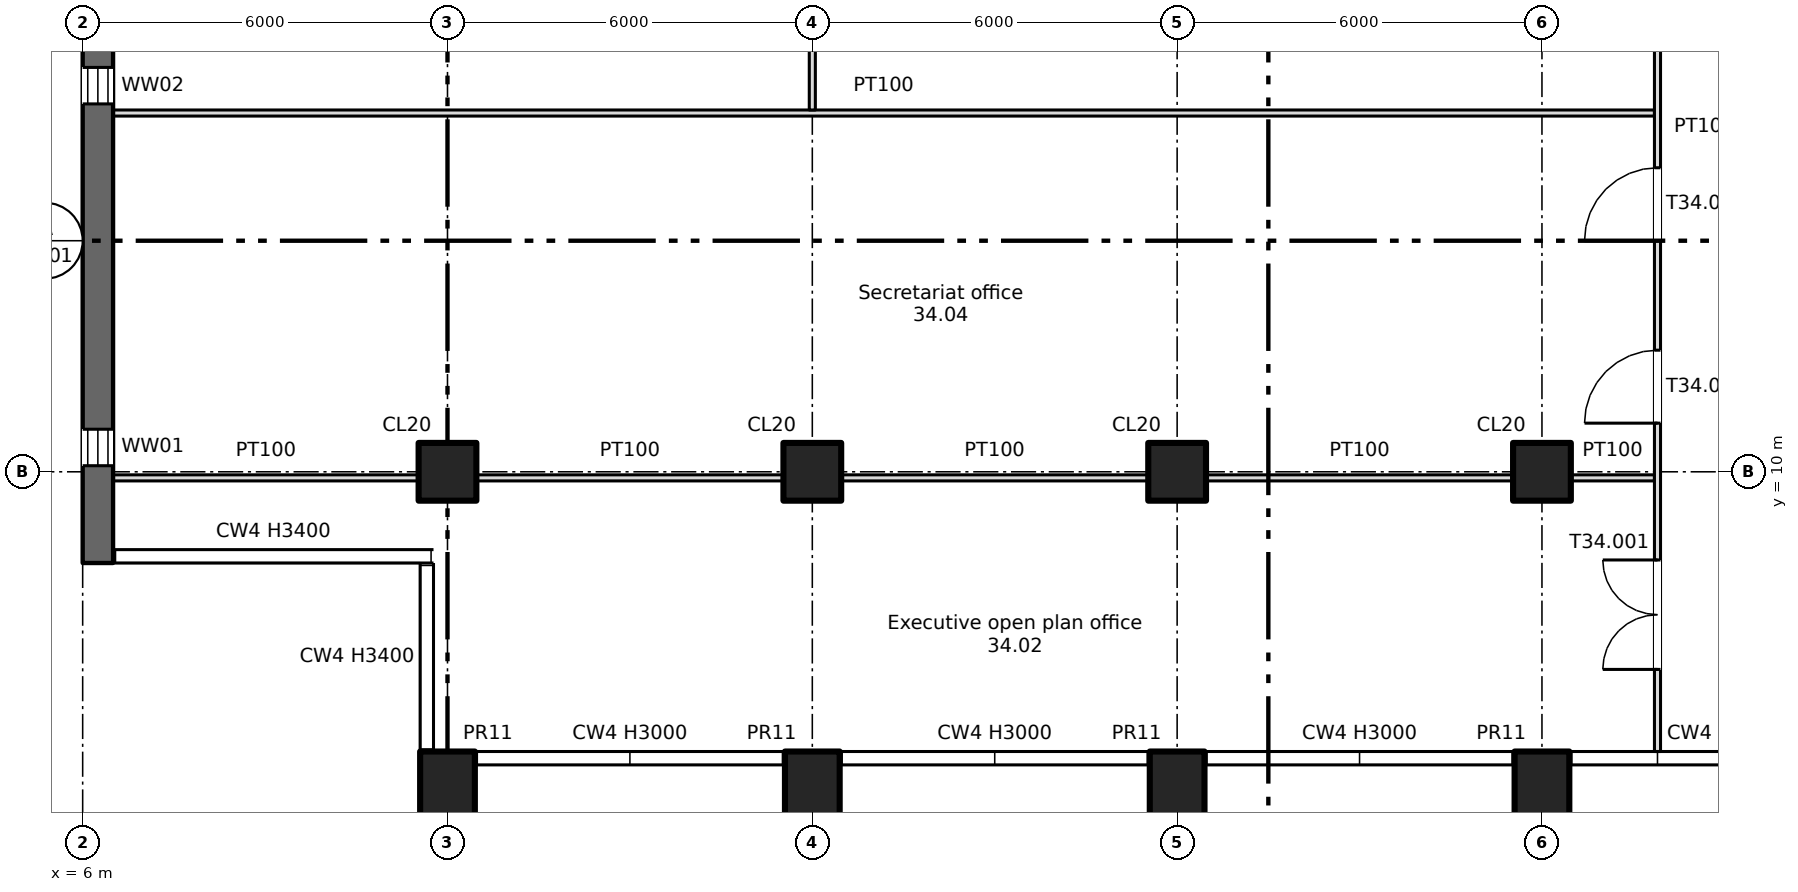
"""IFC4 building model, lengths in metres.
Left out: names, types, materials, properties, quantities, classifications, styles, units other than length and angle.
Written with IfcOpenShell. Run it as: python <this file> out.ifc"""

import sys

from ifc_helpers import new_model, si_unit, direction, frame, frame_2d, origin, origin_2d, place, context, subcontext, project, spatial, rectangle, extrude, element, fill, save


model = new_model("IFC4")
c1 = context("Model", 3, precision=1e-05, world=origin(), true_north=direction((0.0, 1.0)))
c2 = subcontext(c1, "Body", "Model", "MODEL_VIEW")
j1 = project(units=[si_unit("LENGTHUNIT", "METRE"), si_unit("PLANEANGLEUNIT", "RADIAN")], contexts=[c1])
p1 = place(None, origin())
s1 = spatial("IfcSite", under=j1, at=p1, CompositionType="ELEMENT")
p2 = place(p1, origin())
s2 = spatial("IfcBuilding", under=s1, at=p2, CompositionType="ELEMENT")
p3 = place(p2, frame((0.0, 0.0, 235.55)))
s3 = spatial("IfcBuildingStorey", under=s2, at=p3, CompositionType="ELEMENT", Elevation=235.55)
for number, where, z_axis, x_axis in (
    (1, (12.0, 4.7, -0.4), (0.0, 0.0, 1.0), (1.0, 0.0, 0.0)),
    (2, (18.0, 4.7, -0.4), (0.0, 0.0, 1.0), (1.0, 0.0, 0.0)),
    (3, (24.0, 4.7, -0.4), (0.0, 0.0, 1.0), (1.0, 0.0, 0.0)),
    (4, (30.0, 4.7, -0.4), (0.0, 0.0, 1.0), (1.0, 0.0, 0.0)),
):
    element("IfcColumn", number, at=place(p3, frame(where, z_axis=z_axis, x_axis=x_axis)), inside=s3, PredefinedType="COLUMN", context=c2, shape_type="SweptSolid", body=[
        extrude(rectangle(XDim=0.9, YDim=1.4, at=origin_2d()), origin(), (0.0, 0.0, 1.0), 3.8),
    ])
for number, where, z_axis, x_axis in (
    (5, (12.0, 10.0, 0.0), (0.0, 0.0, 1.0), (1.0, 0.0, 0.0)),
    (6, (18.0, 10.0, 0.0), (0.0, 0.0, 1.0), (1.0, 0.0, 0.0)),
    (7, (24.0, 10.0, 0.0), (0.0, 0.0, 1.0), (1.0, 0.0, 0.0)),
    (8, (30.0, 10.0, 0.0), (0.0, 0.0, 1.0), (1.0, 0.0, 0.0)),
):
    element("IfcColumn", number, at=place(p3, frame(where, z_axis=z_axis, x_axis=x_axis)), inside=s3, PredefinedType="COLUMN", context=c2, shape_type="SweptSolid", body=[
        extrude(rectangle(XDim=0.95, YDim=0.95, at=origin_2d()), origin(), (0.0, 0.0, 1.0), 3.4),
    ])
p4 = place(p3, frame((6.25, 8.5, 0.0), z_axis=(0.0, 0.0, 1.0), x_axis=(0.0, 1.0, 0.0)))
e9 = element("IfcWall", 9, at=p4, inside=s3, PredefinedType="SHEAR", context=c2, shape_type="SweptSolid", body=[
    extrude(rectangle(XDim=33.0, YDim=0.5, at=frame_2d((16.5, 0.0))), origin(), (0.0, 0.0, 1.0), 3.4),
])
p5 = place(p4, frame((1.6, 0.0, 0.6)))
e10 = element("IfcOpeningElement", 10, at=p5, cuts=e9, PredefinedType="OPENING", context=c2, shape_type="SweptSolid", body=[
    extrude(rectangle(XDim=0.6, YDim=2.4, at=frame_2d((0.3, 1.2))), frame((0.0, 0.26, 0.0), z_axis=(0.0, -1.0, 0.0), x_axis=(1.0, 0.0, 0.0)), (0.0, 0.0, 1.0), 0.52),
])
p6 = place(p4, frame((7.55, 0.0, 0.6)))
e11 = element("IfcOpeningElement", 11, at=p6, cuts=e9, PredefinedType="OPENING", context=c2, shape_type="SweptSolid", body=[
    extrude(rectangle(XDim=0.6, YDim=2.4, at=frame_2d((0.3, 1.2))), frame((0.0, 0.26, 0.0), z_axis=(0.0, -1.0, 0.0), x_axis=(1.0, 0.0, 0.0)), (0.0, 0.0, 1.0), 0.52),
])
p7 = place(p4, frame((13.2, 0.0, 0.6)))
e12 = element("IfcOpeningElement", 12, at=p7, cuts=e9, PredefinedType="OPENING", context=c2, shape_type="SweptSolid", body=[
    extrude(rectangle(XDim=0.6, YDim=2.4, at=frame_2d((0.3, 1.2))), frame((0.0, 0.26, 0.0), z_axis=(0.0, -1.0, 0.0), x_axis=(1.0, 0.0, 0.0)), (0.0, 0.0, 1.0), 0.52),
])
p8 = place(p3, frame((30.475, 9.9, 0.0), z_axis=(0.0, 0.0, 1.0), x_axis=(1.0, 0.0, 0.0)))
e13 = element("IfcWall", 13, at=p8, inside=s3, PredefinedType="PARTITIONING", context=c2, shape_type="SweptSolid", body=[
    extrude(rectangle(XDim=1.375, YDim=0.1, at=frame_2d((0.688, 0.0))), origin(), (0.0, 0.0, 1.0), 3.4),
])
for number, where, z_axis, x_axis in (
    (14, (24.475, 9.9, 0.0), (0.0, 0.0, 1.0), (1.0, 0.0, 0.0)),
    (15, (18.475, 9.9, 0.0), (0.0, 0.0, 1.0), (1.0, 0.0, 0.0)),
    (16, (12.475, 9.9, 0.0), (0.0, 0.0, 1.0), (1.0, 0.0, 0.0)),
):
    element("IfcWall", number, at=place(p3, frame(where, z_axis=z_axis, x_axis=x_axis)), inside=s3, PredefinedType="PARTITIONING", context=c2, shape_type="SweptSolid", body=[
        extrude(rectangle(XDim=5.05, YDim=0.1, at=frame_2d((2.525, 0.0))), origin(), (0.0, 0.0, 1.0), 3.4),
    ])
p9 = place(p3, frame((6.5, 9.9, 0.0), z_axis=(0.0, 0.0, 1.0), x_axis=(1.0, 0.0, 0.0)))
e17 = element("IfcWall", 17, at=p9, inside=s3, PredefinedType="PARTITIONING", context=c2, shape_type="SweptSolid", body=[
    extrude(rectangle(XDim=5.025, YDim=0.1, at=frame_2d((2.512, 0.0))), origin(), (0.0, 0.0, 1.0), 3.4),
])
p10 = place(p3, frame((6.5, 15.9, 0.0), z_axis=(0.0, 0.0, 1.0), x_axis=(1.0, 0.0, 0.0)))
e18 = element("IfcWall", 18, at=p10, inside=s3, PredefinedType="PARTITIONING", context=c2, shape_type="SweptSolid", body=[
    extrude(rectangle(XDim=25.35, YDim=0.1, at=frame_2d((12.675, 0.0))), origin(), (0.0, 0.0, 1.0), 3.4),
])
p11 = place(p3, frame((18.0, 15.95, 0.0), z_axis=(0.0, 0.0, 1.0), x_axis=(0.0, 1.0, 0.0)))
e19 = element("IfcWall", 19, at=p11, inside=s3, PredefinedType="PARTITIONING", context=c2, shape_type="SweptSolid", body=[
    extrude(rectangle(XDim=2.575, YDim=0.1, at=frame_2d((1.288, 0.0))), origin(), (0.0, 0.0, 1.0), 3.4),
])
p12 = place(p3, frame((31.9, 5.4, 0.0), z_axis=(0.0, 0.0, 1.0), x_axis=(0.0, 1.0, 0.0)))
e20 = element("IfcWall", 20, at=p12, inside=s3, PredefinedType="PARTITIONING", context=c2, shape_type="SweptSolid", body=[
    extrude(rectangle(XDim=20.55, YDim=0.1, at=frame_2d((10.275, 0.0))), origin(), (0.0, 0.0, 1.0), 3.4),
])
p13 = place(p12, frame((1.35, 0.0, 0.0)))
e21 = element("IfcOpeningElement", 21, at=p13, cuts=e20, PredefinedType="OPENING", context=c2, shape_type="SweptSolid", body=[
    extrude(rectangle(XDim=1.8, YDim=2.1, at=frame_2d((0.9, 1.05))), frame((0.0, 0.06, 0.0), z_axis=(0.0, -1.0, 0.0), x_axis=(1.0, 0.0, 0.0)), (0.0, 0.0, 1.0), 0.12),
])
p14 = place(p12, frame((5.4, 0.0, 0.0)))
e22 = element("IfcOpeningElement", 22, at=p14, cuts=e20, PredefinedType="OPENING", context=c2, shape_type="SweptSolid", body=[
    extrude(rectangle(XDim=1.2, YDim=2.1, at=frame_2d((0.6, 1.05))), frame((0.0, 0.06, 0.0), z_axis=(0.0, -1.0, 0.0), x_axis=(1.0, 0.0, 0.0)), (0.0, 0.0, 1.0), 0.12),
])
p15 = place(p12, frame((8.4, 0.0, 0.0)))
e23 = element("IfcOpeningElement", 23, at=p15, cuts=e20, PredefinedType="OPENING", context=c2, shape_type="SweptSolid", body=[
    extrude(rectangle(XDim=1.2, YDim=2.1, at=frame_2d((0.6, 1.05))), frame((0.0, 0.06, 0.0), z_axis=(0.0, -1.0, 0.0), x_axis=(1.0, 0.0, 0.0)), (0.0, 0.0, 1.0), 0.12),
])
p16 = place(p5, origin())
e24 = element("IfcWindow", 24, at=p16, inside=s3, PartitioningType="SINGLE_PANEL", PredefinedType="WINDOW", context=c2, shape_type="SweptSolid", body=[
    extrude(rectangle(XDim=0.6, YDim=2.4, at=frame_2d((0.3, 1.2))), frame((0.0, 0.03, 0.0), z_axis=(0.0, -1.0, 0.0), x_axis=(1.0, 0.0, 0.0)), (0.0, 0.0, 1.0), 0.06),
])
fill(e10, e24)
p17 = place(p6, origin())
e25 = element("IfcWindow", 25, at=p17, inside=s3, PartitioningType="SINGLE_PANEL", PredefinedType="WINDOW", context=c2, shape_type="SweptSolid", body=[
    extrude(rectangle(XDim=0.6, YDim=2.4, at=frame_2d((0.3, 1.2))), frame((0.0, 0.03, 0.0), z_axis=(0.0, -1.0, 0.0), x_axis=(1.0, 0.0, 0.0)), (0.0, 0.0, 1.0), 0.06),
])
fill(e11, e25)
p18 = place(p13, origin())
e26 = element("IfcDoor", 26, at=p18, inside=s3, OperationType="DOUBLE_DOOR_SINGLE_SWING", PredefinedType="DOOR", context=c2, shape_type="SweptSolid", body=[
    extrude(rectangle(XDim=1.8, YDim=2.1, at=frame_2d((0.9, 1.05))), frame((0.0, 0.025, 0.0), z_axis=(0.0, -1.0, 0.0), x_axis=(1.0, 0.0, 0.0)), (0.0, 0.0, 1.0), 0.05),
])
fill(e21, e26)
p19 = place(p14, origin())
e27 = element("IfcDoor", 27, at=p19, inside=s3, OperationType="SINGLE_SWING_LEFT", PredefinedType="DOOR", context=c2, shape_type="SweptSolid", body=[
    extrude(rectangle(XDim=1.2, YDim=2.1, at=frame_2d((0.6, 1.05))), frame((0.0, 0.025, 0.0), z_axis=(0.0, -1.0, 0.0), x_axis=(1.0, 0.0, 0.0)), (0.0, 0.0, 1.0), 0.05),
])
fill(e22, e27)
p20 = place(p15, origin())
e28 = element("IfcDoor", 28, at=p20, inside=s3, OperationType="SINGLE_SWING_LEFT", PredefinedType="DOOR", context=c2, shape_type="SweptSolid", body=[
    extrude(rectangle(XDim=1.2, YDim=2.1, at=frame_2d((0.6, 1.05))), frame((0.0, 0.025, 0.0), z_axis=(0.0, -1.0, 0.0), x_axis=(1.0, 0.0, 0.0)), (0.0, 0.0, 1.0), 0.05),
])
fill(e23, e28)
save(model, sys.argv[1])
